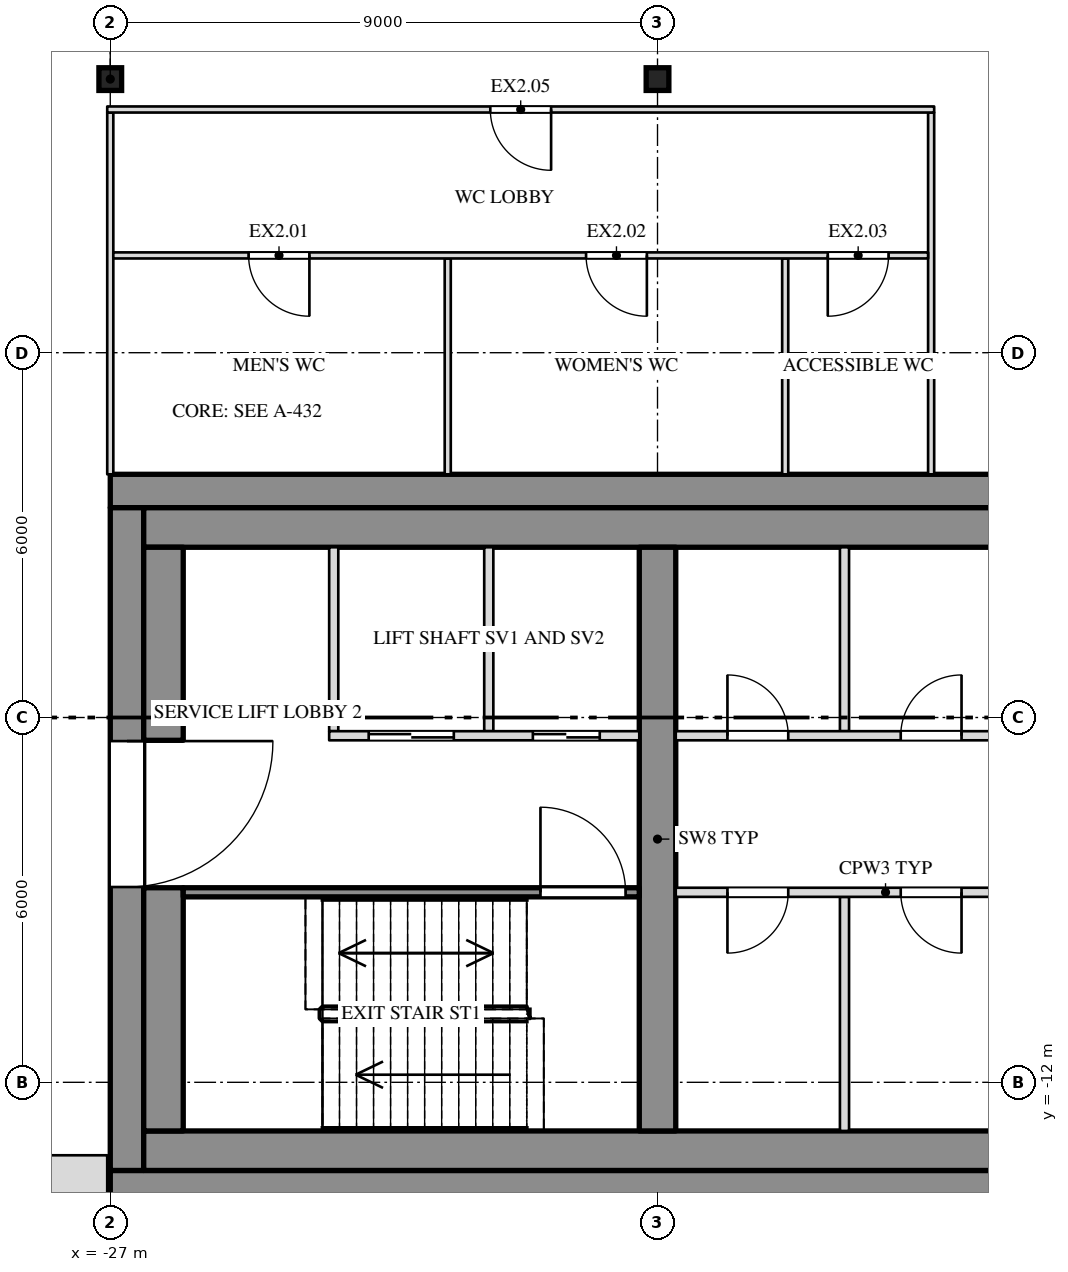
"""IFC4 building model, lengths in metres.
Left out: names, types, materials, properties, quantities, classifications, styles, units other than length and angle.
Written with IfcOpenShell. Run it as: python <this file> out.ifc"""

import sys

from ifc_helpers import new_model, si_unit, direction, frame, frame_2d, origin, origin_2d, place, context, subcontext, project, spatial, rectangle, i_section, extrude, element, fill, save


model = new_model("IFC4")
c1 = context("Model", 3, precision=1e-05, world=origin(), true_north=direction((0.0, 1.0)))
c2 = subcontext(c1, "Body", "Model", "MODEL_VIEW")
j1 = project(units=[si_unit("LENGTHUNIT", "METRE"), si_unit("PLANEANGLEUNIT", "RADIAN")], contexts=[c1])
p1 = place(None, origin())
s1 = spatial("IfcSite", under=j1, at=p1, CompositionType="ELEMENT")
p2 = place(p1, origin())
s2 = spatial("IfcBuilding", under=s1, at=p2, CompositionType="ELEMENT")
p3 = place(p2, frame((0.0, 0.0, 276.5)))
s3 = spatial("IfcBuildingStorey", under=s2, at=p3, CompositionType="ELEMENT", Elevation=276.5)
for number, where, z_axis, x_axis in (
    (1, (-27.0, 4.5, 0.0), (0.0, 0.0, 1.0), (1.0, 0.0, 0.0)),
    (2, (-18.0, 4.5, 0.0), (0.0, 0.0, 1.0), (1.0, 0.0, 0.0)),
):
    element("IfcColumn", number, at=place(p3, frame(where, z_axis=z_axis, x_axis=x_axis)), inside=s3, PredefinedType="COLUMN", context=c2, shape_type="SweptSolid", body=[
        extrude(i_section(OverallWidth=0.373, OverallDepth=0.373, WebThickness=0.016, FlangeThickness=0.026, at=origin_2d()), origin(), (0.0, 0.0, 1.0), 4.0),
    ])
p4 = place(p3, frame((-27.0, -2.275, 0.0), z_axis=(0.0, 0.0, 1.0), x_axis=(1.0, 0.0, 0.0)))
e3 = element("IfcWall", 3, at=p4, inside=s3, PredefinedType="SHEAR", context=c2, shape_type="SweptSolid", body=[
    extrude(rectangle(XDim=54.0, YDim=0.55, at=frame_2d((27.0, 0.0))), origin(), (0.0, 0.0, 1.0), 3.78),
])
p5 = place(p4, frame((15.15, 0.0, 0.0)))
e4 = element("IfcOpeningElement", 4, at=p5, cuts=e3, PredefinedType="OPENING", context=c2, shape_type="SweptSolid", body=[
    extrude(rectangle(XDim=2.4, YDim=2.1, at=frame_2d((1.2, 1.05))), frame((0.0, 0.287, 0.0), z_axis=(0.0, -1.0, 0.0), x_axis=(1.0, 0.0, 0.0)), (0.0, 0.0, 1.0), 0.574),
])
p6 = place(p4, frame((36.45, 0.0, 0.0)))
e5 = element("IfcOpeningElement", 5, at=p6, cuts=e3, PredefinedType="OPENING", context=c2, shape_type="SweptSolid", body=[
    extrude(rectangle(XDim=2.4, YDim=2.1, at=frame_2d((1.2, 1.05))), frame((0.0, 0.287, 0.0), z_axis=(0.0, -1.0, 0.0), x_axis=(1.0, 0.0, 0.0)), (0.0, 0.0, 1.0), 0.574),
])
p7 = place(p3, frame((-27.0, -13.725, 0.0), z_axis=(0.0, 0.0, 1.0), x_axis=(1.0, 0.0, 0.0)))
e6 = element("IfcWall", 6, at=p7, inside=s3, PredefinedType="SHEAR", context=c2, shape_type="SweptSolid", body=[
    extrude(rectangle(XDim=54.0, YDim=0.55, at=frame_2d((27.0, 0.0))), origin(), (0.0, 0.0, 1.0), 3.78),
])
p8 = place(p3, frame((-26.725, -13.45, 0.0), z_axis=(0.0, 0.0, 1.0), x_axis=(0.0, 1.0, 0.0)))
e7 = element("IfcWall", 7, at=p8, inside=s3, PredefinedType="SHEAR", context=c2, shape_type="SweptSolid", body=[
    extrude(rectangle(XDim=10.9, YDim=0.55, at=frame_2d((5.45, 0.0))), origin(), (0.0, 0.0, 1.0), 3.78),
])
p9 = place(p8, frame((4.662, 0.0, 0.0)))
e8 = element("IfcOpeningElement", 8, at=p9, cuts=e7, PredefinedType="OPENING", context=c2, shape_type="SweptSolid", body=[
    extrude(rectangle(XDim=2.4, YDim=2.1, at=frame_2d((1.2, 1.05))), frame((0.0, 0.287, 0.0), z_axis=(0.0, -1.0, 0.0), x_axis=(1.0, 0.0, 0.0)), (0.0, 0.0, 1.0), 0.574),
])
p10 = place(p3, frame((-26.45, -2.875, 0.0), z_axis=(0.0, 0.0, 1.0), x_axis=(1.0, 0.0, 0.0)))
e9 = element("IfcWall", 9, at=p10, inside=s3, PredefinedType="SHEAR", context=c2, shape_type="SweptSolid", body=[
    extrude(rectangle(XDim=14.45, YDim=0.65, at=frame_2d((7.225, 0.0))), origin(), (0.0, 0.0, 1.0), 3.78),
])
p11 = place(p3, frame((-26.45, -13.125, 0.0), z_axis=(0.0, 0.0, 1.0), x_axis=(1.0, 0.0, 0.0)))
e10 = element("IfcWall", 10, at=p11, inside=s3, PredefinedType="SHEAR", context=c2, shape_type="SweptSolid", body=[
    extrude(rectangle(XDim=52.9, YDim=0.65, at=frame_2d((26.45, 0.0))), origin(), (0.0, 0.0, 1.0), 3.78),
])
p12 = place(p3, frame((-26.125, -12.8, 0.0), z_axis=(0.0, 0.0, 1.0), x_axis=(0.0, 1.0, 0.0)))
e11 = element("IfcWall", 11, at=p12, inside=s3, PredefinedType="SHEAR", context=c2, shape_type="SweptSolid", body=[
    extrude(rectangle(XDim=4.0, YDim=0.65, at=frame_2d((2.0, 0.0))), origin(), (0.0, 0.0, 1.0), 3.78),
])
p13 = place(p3, frame((-26.125, -6.375, 0.0), z_axis=(0.0, 0.0, 1.0), x_axis=(0.0, 1.0, 0.0)))
e12 = element("IfcWall", 12, at=p13, inside=s3, PredefinedType="SHEAR", context=c2, shape_type="SweptSolid", body=[
    extrude(rectangle(XDim=3.175, YDim=0.65, at=frame_2d((1.587, 0.0))), origin(), (0.0, 0.0, 1.0), 3.78),
])
p14 = place(p3, frame((-18.0, -12.8, 0.0), z_axis=(0.0, 0.0, 1.0), x_axis=(0.0, 1.0, 0.0)))
e13 = element("IfcWall", 13, at=p14, inside=s3, PredefinedType="SHEAR", context=c2, shape_type="SweptSolid", body=[
    extrude(rectangle(XDim=9.6, YDim=0.6, at=frame_2d((4.8, 0.0))), origin(), (0.0, 0.0, 1.0), 3.78),
])
p15 = place(p3, frame((-27.0, -2.0, 0.0), z_axis=(0.0, 0.0, 1.0), x_axis=(0.0, 1.0, 0.0)))
e14 = element("IfcWall", 14, at=p15, inside=s3, PredefinedType="PARTITIONING", context=c2, shape_type="SweptSolid", body=[
    extrude(rectangle(XDim=5.95, YDim=0.1, at=frame_2d((2.975, 0.0))), origin(), (0.0, 0.0, 1.0), 3.247),
])
for number, where, z_axis, x_axis in (
    (15, (-21.45, -2.0, 0.0), (0.0, 0.0, 1.0), (0.0, 1.0, 0.0)),
    (16, (-15.9, -2.0, 0.0), (0.0, 0.0, 1.0), (0.0, 1.0, 0.0)),
):
    element("IfcWall", number, at=place(p3, frame(where, z_axis=z_axis, x_axis=x_axis)), inside=s3, PredefinedType="PARTITIONING", context=c2, shape_type="SweptSolid", body=[
        extrude(rectangle(XDim=3.55, YDim=0.1, at=frame_2d((1.775, 0.0))), origin(), (0.0, 0.0, 1.0), 3.78),
    ])
p16 = place(p3, frame((-13.5, -2.0, 0.0), z_axis=(0.0, 0.0, 1.0), x_axis=(0.0, 1.0, 0.0)))
e17 = element("IfcWall", 17, at=p16, inside=s3, PredefinedType="PARTITIONING", context=c2, shape_type="SweptSolid", body=[
    extrude(rectangle(XDim=5.95, YDim=0.1, at=frame_2d((2.975, 0.0))), origin(), (0.0, 0.0, 1.0), 3.247),
])
p17 = place(p3, frame((-26.95, 1.6, 0.0), z_axis=(0.0, 0.0, 1.0), x_axis=(1.0, 0.0, 0.0)))
e18 = element("IfcWall", 18, at=p17, inside=s3, PredefinedType="PARTITIONING", context=c2, shape_type="SweptSolid", body=[
    extrude(rectangle(XDim=13.4, YDim=0.1, at=frame_2d((6.7, 0.0))), origin(), (0.0, 0.0, 1.0), 3.78),
])
p18 = place(p17, frame((2.225, 0.0, 0.0)))
e19 = element("IfcOpeningElement", 19, at=p18, cuts=e18, PredefinedType="OPENING", context=c2, shape_type="SweptSolid", body=[
    extrude(rectangle(XDim=1.0, YDim=2.1, at=frame_2d((0.5, 1.05))), frame((0.0, 0.062, 0.0), z_axis=(0.0, -1.0, 0.0), x_axis=(1.0, 0.0, 0.0)), (0.0, 0.0, 1.0), 0.124),
])
p19 = place(p17, frame((7.775, 0.0, 0.0)))
e20 = element("IfcOpeningElement", 20, at=p19, cuts=e18, PredefinedType="OPENING", context=c2, shape_type="SweptSolid", body=[
    extrude(rectangle(XDim=1.0, YDim=2.1, at=frame_2d((0.5, 1.05))), frame((0.0, 0.062, 0.0), z_axis=(0.0, -1.0, 0.0), x_axis=(1.0, 0.0, 0.0)), (0.0, 0.0, 1.0), 0.124),
])
p20 = place(p17, frame((11.75, 0.0, 0.0)))
e21 = element("IfcOpeningElement", 21, at=p20, cuts=e18, PredefinedType="OPENING", context=c2, shape_type="SweptSolid", body=[
    extrude(rectangle(XDim=1.0, YDim=2.1, at=frame_2d((0.5, 1.05))), frame((0.0, 0.062, 0.0), z_axis=(0.0, -1.0, 0.0), x_axis=(1.0, 0.0, 0.0)), (0.0, 0.0, 1.0), 0.124),
])
p21 = place(p3, frame((-27.05, 4.0, 0.0), z_axis=(0.0, 0.0, 1.0), x_axis=(1.0, 0.0, 0.0)))
e22 = element("IfcWall", 22, at=p21, inside=s3, PredefinedType="PARTITIONING", context=c2, shape_type="SweptSolid", body=[
    extrude(rectangle(XDim=13.6, YDim=0.1, at=frame_2d((6.8, 0.0))), origin(), (0.0, 0.0, 1.0), 3.78),
])
p22 = place(p21, frame((6.3, 0.0, 0.0)))
e23 = element("IfcOpeningElement", 23, at=p22, cuts=e22, PredefinedType="OPENING", context=c2, shape_type="SweptSolid", body=[
    extrude(rectangle(XDim=1.0, YDim=2.1, at=frame_2d((0.5, 1.05))), frame((0.0, 0.062, 0.0), z_axis=(0.0, -1.0, 0.0), x_axis=(1.0, 0.0, 0.0)), (0.0, 0.0, 1.0), 0.124),
])
p23 = place(p3, frame((-29.948, -13.6, 0.0), z_axis=(0.0, 0.0, 1.0), x_axis=(1.0, 0.0, 0.0)))
e24 = element("IfcWall", 24, at=p23, inside=s3, PredefinedType="SOLIDWALL", context=c2, shape_type="SweptSolid", body=[
    extrude(rectangle(XDim=2.897, YDim=0.8, at=frame_2d((1.449, 0.0))), origin(), (0.0, 0.0, 1.0), 3.78),
])
for number, where, z_axis, x_axis in (
    (25, (-20.775, -6.225, 0.0), (0.0, 0.0, 1.0), (0.0, 1.0, 0.0)),
    (26, (-23.325, -6.225, 0.0), (0.0, 0.0, 1.0), (0.0, 1.0, 0.0)),
    (27, (-14.925, -6.225, 0.0), (0.0, 0.0, 1.0), (0.0, 1.0, 0.0)),
):
    element("IfcWall", number, at=place(p3, frame(where, z_axis=z_axis, x_axis=x_axis)), inside=s3, PredefinedType="PARTITIONING", context=c2, shape_type="SweptSolid", body=[
        extrude(rectangle(XDim=3.025, YDim=0.15, at=frame_2d((1.513, 0.0))), origin(), (0.0, 0.0, 1.0), 3.78),
    ])
p24 = place(p3, frame((-14.925, -12.8, 0.0), z_axis=(0.0, 0.0, 1.0), x_axis=(0.0, 1.0, 0.0)))
e28 = element("IfcWall", 28, at=p24, inside=s3, PredefinedType="PARTITIONING", context=c2, shape_type="SweptSolid", body=[
    extrude(rectangle(XDim=3.85, YDim=0.15, at=frame_2d((1.925, 0.0))), origin(), (0.0, 0.0, 1.0), 3.78),
])
p25 = place(p3, frame((-23.4, -6.3, 0.0), z_axis=(0.0, 0.0, 1.0), x_axis=(1.0, 0.0, 0.0)))
e29 = element("IfcWall", 29, at=p25, inside=s3, PredefinedType="PARTITIONING", context=c2, shape_type="SweptSolid", body=[
    extrude(rectangle(XDim=5.1, YDim=0.15, at=frame_2d((2.55, 0.0))), origin(), (0.0, 0.0, 1.0), 3.78),
])
p26 = place(p25, frame((0.65, 0.0, 0.0)))
e30 = element("IfcOpeningElement", 30, at=p26, cuts=e29, PredefinedType="OPENING", context=c2, shape_type="SweptSolid", body=[
    extrude(rectangle(XDim=1.4, YDim=2.1, at=frame_2d((0.7, 1.05))), frame((0.0, 0.087, 0.0), z_axis=(0.0, -1.0, 0.0), x_axis=(1.0, 0.0, 0.0)), (0.0, 0.0, 1.0), 0.174),
])
p27 = place(p25, frame((3.35, 0.0, 0.0)))
e31 = element("IfcOpeningElement", 31, at=p27, cuts=e29, PredefinedType="OPENING", context=c2, shape_type="SweptSolid", body=[
    extrude(rectangle(XDim=1.1, YDim=2.1, at=frame_2d((0.55, 1.05))), frame((0.0, 0.087, 0.0), z_axis=(0.0, -1.0, 0.0), x_axis=(1.0, 0.0, 0.0)), (0.0, 0.0, 1.0), 0.174),
])
p28 = place(p3, frame((-17.7, -6.3, 0.0), z_axis=(0.0, 0.0, 1.0), x_axis=(1.0, 0.0, 0.0)))
e32 = element("IfcWall", 32, at=p28, inside=s3, PredefinedType="PARTITIONING", context=c2, shape_type="SweptSolid", body=[
    extrude(rectangle(XDim=5.7, YDim=0.15, at=frame_2d((2.85, 0.0))), origin(), (0.0, 0.0, 1.0), 3.78),
])
p29 = place(p28, frame((0.85, 0.0, 0.0)))
e33 = element("IfcOpeningElement", 33, at=p29, cuts=e32, PredefinedType="OPENING", context=c2, shape_type="SweptSolid", body=[
    extrude(rectangle(XDim=1.0, YDim=2.1, at=frame_2d((0.5, 1.05))), frame((0.0, 0.087, 0.0), z_axis=(0.0, -1.0, 0.0), x_axis=(1.0, 0.0, 0.0)), (0.0, 0.0, 1.0), 0.174),
])
p30 = place(p28, frame((3.7, 0.0, 0.0)))
e34 = element("IfcOpeningElement", 34, at=p30, cuts=e32, PredefinedType="OPENING", context=c2, shape_type="SweptSolid", body=[
    extrude(rectangle(XDim=1.0, YDim=2.1, at=frame_2d((0.5, 1.05))), frame((0.0, 0.087, 0.0), z_axis=(0.0, -1.0, 0.0), x_axis=(1.0, 0.0, 0.0)), (0.0, 0.0, 1.0), 0.174),
])
p31 = place(p3, frame((-25.8, -8.875, 0.0), z_axis=(0.0, 0.0, 1.0), x_axis=(1.0, 0.0, 0.0)))
e35 = element("IfcWall", 35, at=p31, inside=s3, PredefinedType="SHEAR", context=c2, shape_type="SweptSolid", body=[
    extrude(rectangle(XDim=7.5, YDim=0.15, at=frame_2d((3.75, 0.0))), origin(), (0.0, 0.0, 1.0), 3.78),
])
p32 = place(p31, frame((5.875, 0.0, 0.0)))
e36 = element("IfcOpeningElement", 36, at=p32, cuts=e35, PredefinedType="OPENING", context=c2, shape_type="SweptSolid", body=[
    extrude(rectangle(XDim=1.4, YDim=2.1, at=frame_2d((0.7, 1.05))), frame((0.0, 0.087, 0.0), z_axis=(0.0, -1.0, 0.0), x_axis=(1.0, 0.0, 0.0)), (0.0, 0.0, 1.0), 0.174),
])
p33 = place(p3, frame((-17.7, -8.875, 0.0), z_axis=(0.0, 0.0, 1.0), x_axis=(1.0, 0.0, 0.0)))
e37 = element("IfcWall", 37, at=p33, inside=s3, PredefinedType="PARTITIONING", context=c2, shape_type="SweptSolid", body=[
    extrude(rectangle(XDim=6.9, YDim=0.15, at=frame_2d((3.45, 0.0))), origin(), (0.0, 0.0, 1.0), 3.78),
])
p34 = place(p33, frame((0.85, 0.0, 0.0)))
e38 = element("IfcOpeningElement", 38, at=p34, cuts=e37, PredefinedType="OPENING", context=c2, shape_type="SweptSolid", body=[
    extrude(rectangle(XDim=1.0, YDim=2.1, at=frame_2d((0.5, 1.05))), frame((0.0, 0.087, 0.0), z_axis=(0.0, -1.0, 0.0), x_axis=(1.0, 0.0, 0.0)), (0.0, 0.0, 1.0), 0.174),
])
p35 = place(p33, frame((3.7, 0.0, 0.0)))
e39 = element("IfcOpeningElement", 39, at=p35, cuts=e37, PredefinedType="OPENING", context=c2, shape_type="SweptSolid", body=[
    extrude(rectangle(XDim=1.0, YDim=2.1, at=frame_2d((0.5, 1.05))), frame((0.0, 0.087, 0.0), z_axis=(0.0, -1.0, 0.0), x_axis=(1.0, 0.0, 0.0)), (0.0, 0.0, 1.0), 0.174),
])
p36 = place(p18, origin())
e40 = element("IfcDoor", 40, at=p36, inside=s3, OperationType="SINGLE_SWING_LEFT", PredefinedType="DOOR", context=c2, shape_type="SweptSolid", body=[
    extrude(rectangle(XDim=1.0, YDim=2.1, at=frame_2d((0.5, 1.05))), frame((0.0, 0.025, 0.0), z_axis=(0.0, -1.0, 0.0), x_axis=(1.0, 0.0, 0.0)), (0.0, 0.0, 1.0), 0.05),
])
fill(e19, e40)
p37 = place(p19, origin())
e41 = element("IfcDoor", 41, at=p37, inside=s3, OperationType="SINGLE_SWING_LEFT", PredefinedType="DOOR", context=c2, shape_type="SweptSolid", body=[
    extrude(rectangle(XDim=1.0, YDim=2.1, at=frame_2d((0.5, 1.05))), frame((0.0, 0.025, 0.0), z_axis=(0.0, -1.0, 0.0), x_axis=(1.0, 0.0, 0.0)), (0.0, 0.0, 1.0), 0.05),
])
fill(e20, e41)
p38 = place(p20, origin())
e42 = element("IfcDoor", 42, at=p38, inside=s3, OperationType="SINGLE_SWING_RIGHT", PredefinedType="DOOR", context=c2, shape_type="SweptSolid", body=[
    extrude(rectangle(XDim=1.0, YDim=2.1, at=frame_2d((0.5, 1.05))), frame((0.0, 0.025, 0.0), z_axis=(0.0, -1.0, 0.0), x_axis=(1.0, 0.0, 0.0)), (0.0, 0.0, 1.0), 0.05),
])
fill(e21, e42)
p39 = place(p22, origin())
e43 = element("IfcDoor", 43, at=p39, inside=s3, OperationType="SINGLE_SWING_LEFT", PredefinedType="DOOR", context=c2, shape_type="SweptSolid", body=[
    extrude(rectangle(XDim=1.0, YDim=2.1, at=frame_2d((0.5, 1.05))), frame((0.0, 0.025, 0.0), z_axis=(0.0, -1.0, 0.0), x_axis=(1.0, 0.0, 0.0)), (0.0, 0.0, 1.0), 0.05),
])
fill(e23, e43)
p40 = place(p9, origin())
e44 = element("IfcDoor", 44, at=p40, inside=s3, OperationType="DOUBLE_DOOR_SINGLE_SWING", PredefinedType="DOOR", context=c2, shape_type="SweptSolid", body=[
    extrude(rectangle(XDim=2.4, YDim=2.1, at=frame_2d((1.2, 1.05))), frame((0.0, 0.025, 0.0), z_axis=(0.0, -1.0, 0.0), x_axis=(1.0, 0.0, 0.0)), (0.0, 0.0, 1.0), 0.05),
])
fill(e8, e44)
p41 = place(p26, origin())
e45 = element("IfcDoor", 45, at=p41, inside=s3, OperationType="SLIDING_TO_RIGHT", PredefinedType="DOOR", context=c2, shape_type="SweptSolid", body=[
    extrude(rectangle(XDim=1.4, YDim=2.1, at=frame_2d((0.7, 1.05))), frame((0.0, 0.025, 0.0), z_axis=(0.0, -1.0, 0.0), x_axis=(1.0, 0.0, 0.0)), (0.0, 0.0, 1.0), 0.05),
])
fill(e30, e45)
p42 = place(p27, origin())
e46 = element("IfcDoor", 46, at=p42, inside=s3, OperationType="SLIDING_TO_LEFT", PredefinedType="DOOR", context=c2, shape_type="SweptSolid", body=[
    extrude(rectangle(XDim=1.1, YDim=2.1, at=frame_2d((0.55, 1.05))), frame((0.0, 0.025, 0.0), z_axis=(0.0, -1.0, 0.0), x_axis=(1.0, 0.0, 0.0)), (0.0, 0.0, 1.0), 0.05),
])
fill(e31, e46)
p43 = place(p32, origin())
e47 = element("IfcDoor", 47, at=p43, inside=s3, OperationType="DOUBLE_DOOR_SINGLE_SWING", PredefinedType="DOOR", context=c2, shape_type="SweptSolid", body=[
    extrude(rectangle(XDim=1.4, YDim=2.1, at=frame_2d((0.7, 1.05))), frame((0.0, 0.025, 0.0), z_axis=(0.0, -1.0, 0.0), x_axis=(1.0, 0.0, 0.0)), (0.0, 0.0, 1.0), 0.05),
])
fill(e36, e47)
p44 = place(p34, origin())
e48 = element("IfcDoor", 48, at=p44, inside=s3, OperationType="SINGLE_SWING_RIGHT", PredefinedType="DOOR", context=c2, shape_type="SweptSolid", body=[
    extrude(rectangle(XDim=1.0, YDim=2.1, at=frame_2d((0.5, 1.05))), frame((0.0, 0.025, 0.0), z_axis=(0.0, -1.0, 0.0), x_axis=(1.0, 0.0, 0.0)), (0.0, 0.0, 1.0), 0.05),
])
fill(e38, e48)
p45 = place(p29, origin())
e49 = element("IfcDoor", 49, at=p45, inside=s3, OperationType="SINGLE_SWING_LEFT", PredefinedType="DOOR", context=c2, shape_type="SweptSolid", body=[
    extrude(rectangle(XDim=1.0, YDim=2.1, at=frame_2d((0.5, 1.05))), frame((0.0, 0.025, 0.0), z_axis=(0.0, -1.0, 0.0), x_axis=(1.0, 0.0, 0.0)), (0.0, 0.0, 1.0), 0.05),
])
fill(e33, e49)
p46 = place(p35, origin())
e50 = element("IfcDoor", 50, at=p46, inside=s3, OperationType="SINGLE_SWING_LEFT", PredefinedType="DOOR", context=c2, shape_type="SweptSolid", body=[
    extrude(rectangle(XDim=1.0, YDim=2.1, at=frame_2d((0.5, 1.05))), frame((0.0, 0.025, 0.0), z_axis=(0.0, -1.0, 0.0), x_axis=(1.0, 0.0, 0.0)), (0.0, 0.0, 1.0), 0.05),
])
fill(e39, e50)
p47 = place(p30, origin())
e51 = element("IfcDoor", 51, at=p47, inside=s3, OperationType="SINGLE_SWING_RIGHT", PredefinedType="DOOR", context=c2, shape_type="SweptSolid", body=[
    extrude(rectangle(XDim=1.0, YDim=2.1, at=frame_2d((0.5, 1.05))), frame((0.0, 0.025, 0.0), z_axis=(0.0, -1.0, 0.0), x_axis=(1.0, 0.0, 0.0)), (0.0, 0.0, 1.0), 0.05),
])
fill(e34, e51)
save(model, sys.argv[1])
